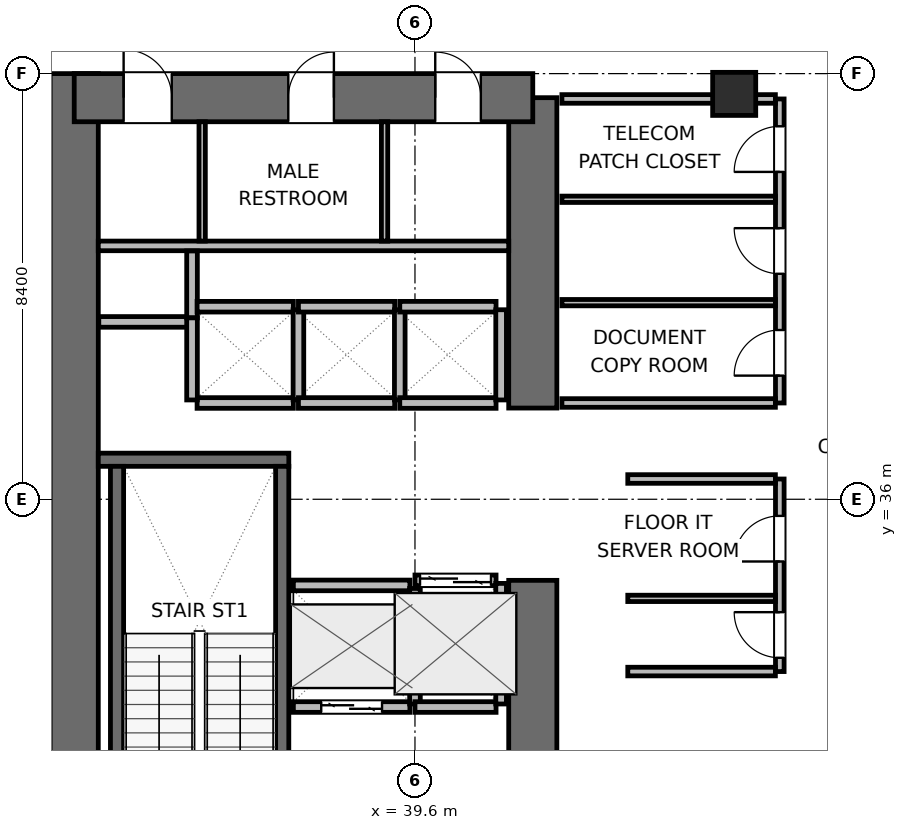
"""IFC4 building model, lengths in metres.
Left out: names, types, materials, properties, quantities, classifications, styles, units other than length and angle.
Written with IfcOpenShell. Run it as: python <this file> out.ifc"""

import sys

from ifc_helpers import new_model, si_unit, direction, frame, frame_2d, origin, origin_2d, place, context, subcontext, project, spatial, rectangle, extrude, element, fill, save


model = new_model("IFC4")
c1 = context("Model", 3, precision=1e-05, world=origin(), true_north=direction((0.0, 1.0)))
c2 = subcontext(c1, "Body", "Model", "MODEL_VIEW")
j1 = project(units=[si_unit("LENGTHUNIT", "METRE"), si_unit("PLANEANGLEUNIT", "RADIAN")], contexts=[c1])
p1 = place(None, origin())
s1 = spatial("IfcSite", under=j1, at=p1, CompositionType="ELEMENT")
p2 = place(p1, origin())
s2 = spatial("IfcBuilding", under=s1, at=p2, CompositionType="ELEMENT")
p3 = place(p2, frame((0.0, 0.0, 37.2)))
s3 = spatial("IfcBuildingStorey", under=s2, at=p3, CompositionType="ELEMENT", Elevation=37.2)
p4 = place(p3, frame((32.875, 27.6, 0.0), z_axis=(0.0, 0.0, 1.0), x_axis=(0.0, 1.0, 0.0)))
e1 = element("IfcWall", 1, at=p4, inside=s3, PredefinedType="SHEAR", context=c2, shape_type="SweptSolid", body=[
    extrude(rectangle(XDim=16.8, YDim=0.95, at=frame_2d((8.4, 0.0))), origin(), (0.0, 0.0, 1.0), 3.9),
])
p5 = place(p3, frame((41.925, 28.075, 0.0), z_axis=(0.0, 0.0, 1.0), x_axis=(0.0, 1.0, 0.0)))
e2 = element("IfcWall", 2, at=p5, inside=s3, PredefinedType="SHEAR", context=c2, shape_type="SweptSolid", body=[
    extrude(rectangle(XDim=6.325, YDim=0.95, at=frame_2d((3.163, 0.0))), origin(), (0.0, 0.0, 1.0), 3.9),
])
p6 = place(p3, frame((41.925, 37.8, 0.0), z_axis=(0.0, 0.0, 1.0), x_axis=(0.0, 1.0, 0.0)))
e3 = element("IfcWall", 3, at=p6, inside=s3, PredefinedType="SHEAR", context=c2, shape_type="SweptSolid", body=[
    extrude(rectangle(XDim=6.125, YDim=0.95, at=frame_2d((3.062, 0.0))), origin(), (0.0, 0.0, 1.0), 3.9),
])
p7 = place(p3, frame((32.875, 43.925, 0.0), z_axis=(0.0, 0.0, 1.0), x_axis=(1.0, 0.0, 0.0)))
e4 = element("IfcWall", 4, at=p7, inside=s3, PredefinedType="SHEAR", context=c2, shape_type="SweptSolid", body=[
    extrude(rectangle(XDim=9.05, YDim=0.95, at=frame_2d((4.525, 0.0))), origin(), (0.0, 0.0, 1.0), 3.9),
])
p8 = place(p7, frame((0.975, 0.0, 0.0)))
e5 = element("IfcOpeningElement", 5, at=p8, cuts=e4, PredefinedType="OPENING", context=c2, shape_type="SweptSolid", body=[
    extrude(rectangle(XDim=0.95, YDim=2.04, at=frame_2d((0.475, 1.02))), frame((0.0, 0.485, 0.0), z_axis=(0.0, -1.0, 0.0), x_axis=(1.0, 0.0, 0.0)), (0.0, 0.0, 1.0), 0.97),
])
p9 = place(p7, frame((4.225, 0.0, 0.0)))
e6 = element("IfcOpeningElement", 6, at=p9, cuts=e4, PredefinedType="OPENING", context=c2, shape_type="SweptSolid", body=[
    extrude(rectangle(XDim=0.9, YDim=2.02, at=frame_2d((0.45, 1.01))), frame((0.0, 0.485, 0.0), z_axis=(0.0, -1.0, 0.0), x_axis=(1.0, 0.0, 0.0)), (0.0, 0.0, 1.0), 0.97),
])
p10 = place(p7, frame((7.125, 0.0, 0.0)))
e7 = element("IfcOpeningElement", 7, at=p10, cuts=e4, PredefinedType="OPENING", context=c2, shape_type="SweptSolid", body=[
    extrude(rectangle(XDim=0.9, YDim=2.02, at=frame_2d((0.45, 1.01))), frame((0.0, 0.485, 0.0), z_axis=(0.0, -1.0, 0.0), x_axis=(1.0, 0.0, 0.0)), (0.0, 0.0, 1.0), 0.97),
])
p11 = place(p3, frame((33.35, 36.78, 0.0), z_axis=(0.0, 0.0, 1.0), x_axis=(1.0, 0.0, 0.0)))
e8 = element("IfcWall", 8, at=p11, inside=s3, PredefinedType="SHEAR", context=c2, shape_type="SweptSolid", body=[
    extrude(rectangle(XDim=3.76, YDim=0.26, at=frame_2d((1.88, 0.0))), origin(), (0.0, 0.0, 1.0), 3.9),
])
p12 = place(p3, frame((33.72, 29.05, 0.0), z_axis=(0.0, 0.0, 1.0), x_axis=(0.0, 1.0, 0.0)))
e9 = element("IfcWall", 9, at=p12, inside=s3, PredefinedType="SHEAR", context=c2, shape_type="SweptSolid", body=[
    extrude(rectangle(XDim=7.6, YDim=0.26, at=frame_2d((3.8, 0.0))), origin(), (0.0, 0.0, 1.0), 3.9),
])
p13 = place(p3, frame((36.98, 29.05, 0.0), z_axis=(0.0, 0.0, 1.0), x_axis=(0.0, 1.0, 0.0)))
e10 = element("IfcWall", 10, at=p13, inside=s3, PredefinedType="SHEAR", context=c2, shape_type="SweptSolid", body=[
    extrude(rectangle(XDim=7.6, YDim=0.26, at=frame_2d((3.8, 0.0))), origin(), (0.0, 0.0, 1.0), 3.9),
])
p14 = place(p13, frame((0.3, 0.0, 0.0)))
e11 = element("IfcOpeningElement", 11, at=p14, cuts=e10, PredefinedType="OPENING", context=c2, shape_type="SweptSolid", body=[
    extrude(rectangle(XDim=1.0, YDim=2.04, at=frame_2d((0.5, 1.02))), frame((0.0, 0.14, 0.0), z_axis=(0.0, -1.0, 0.0), x_axis=(1.0, 0.0, 0.0)), (0.0, 0.0, 1.0), 0.28),
])
p15 = place(p3, frame((45.9, 44.0, 0.0), z_axis=(0.0, 0.0, 1.0), x_axis=(1.0, 0.0, 0.0)))
e12 = element("IfcColumn", 12, at=p15, inside=s3, PredefinedType="COLUMN", context=c2, shape_type="SweptSolid", body=[
    extrude(rectangle(XDim=0.85, YDim=0.85, at=origin_2d()), origin(), (0.0, 0.0, 1.0), 3.9),
])
p16 = place(p3, frame((33.35, 41.0, 0.0), z_axis=(0.0, 0.0, 1.0), x_axis=(1.0, 0.0, 0.0)))
e13 = element("IfcWall", 13, at=p16, inside=s3, PredefinedType="PLUMBINGWALL", context=c2, shape_type="SweptSolid", body=[
    extrude(rectangle(XDim=8.1, YDim=0.19, at=frame_2d((4.05, 0.0))), origin(), (0.0, 0.0, 1.0), 3.64),
])
for number, where, z_axis, x_axis in (
    (14, (35.4, 41.095, 0.0), (0.0, 0.0, 1.0), (0.0, 1.0, 0.0)),
    (15, (39.0, 41.095, 0.0), (0.0, 0.0, 1.0), (0.0, 1.0, 0.0)),
):
    element("IfcWall", number, at=place(p3, frame(where, z_axis=z_axis, x_axis=x_axis)), inside=s3, PredefinedType="PARTITIONING", context=c2, shape_type="SweptSolid", body=[
        extrude(rectangle(XDim=2.355, YDim=0.125, at=frame_2d((1.177, 0.0))), origin(), (0.0, 0.0, 1.0), 3.64),
    ])
p17 = place(p3, frame((33.36, 39.5, 0.0), z_axis=(0.0, 0.0, 1.0), x_axis=(1.0, 0.0, 0.0)))
e16 = element("IfcWall", 16, at=p17, inside=s3, PredefinedType="PARTITIONING", context=c2, shape_type="SweptSolid", body=[
    extrude(rectangle(XDim=1.86, YDim=0.21, at=frame_2d((0.93, 0.0))), origin(), (0.0, 0.0, 1.0), 3.64),
])
p18 = place(p3, frame((35.2, 39.58, 0.0), z_axis=(0.0, 0.0, 1.0), x_axis=(0.0, 1.0, 0.0)))
e17 = element("IfcWall", 17, at=p18, inside=s3, PredefinedType="PARTITIONING", context=c2, shape_type="SweptSolid", body=[
    extrude(rectangle(XDim=1.32, YDim=0.21, at=frame_2d((0.66, 0.0))), origin(), (0.0, 0.0, 1.0), 3.64),
])
p19 = place(p3, frame((37.2, 31.9, 0.0), z_axis=(0.0, 0.0, 1.0), x_axis=(1.0, 0.0, 0.0)))
e18 = element("IfcWall", 18, at=p19, inside=s3, PredefinedType="PARTITIONING", context=c2, shape_type="SweptSolid", body=[
    extrude(rectangle(XDim=2.3, YDim=0.21, at=frame_2d((1.15, 0.0))), origin(), (0.0, 0.0, 1.0), 3.64),
])
p20 = place(p19, frame((0.55, 0.0, 0.0)))
e19 = element("IfcOpeningElement", 19, at=p20, cuts=e18, PredefinedType="OPENING", context=c2, shape_type="SweptSolid", body=[
    extrude(rectangle(XDim=1.2, YDim=2.04, at=frame_2d((0.6, 1.02))), frame((0.0, 0.115, 0.0), z_axis=(0.0, -1.0, 0.0), x_axis=(1.0, 0.0, 0.0)), (0.0, 0.0, 1.0), 0.23),
])
p21 = place(p3, frame((37.2, 34.3, 0.0), z_axis=(0.0, 0.0, 1.0), x_axis=(1.0, 0.0, 0.0)))
e20 = element("IfcWall", 20, at=p21, inside=s3, PredefinedType="PARTITIONING", context=c2, shape_type="SweptSolid", body=[
    extrude(rectangle(XDim=2.3, YDim=0.21, at=frame_2d((1.15, 0.0))), origin(), (0.0, 0.0, 1.0), 3.64),
])
p22 = place(p3, frame((39.6, 31.96, 0.0), z_axis=(0.0, 0.0, 1.0), x_axis=(0.0, 1.0, 0.0)))
e21 = element("IfcWall", 21, at=p22, inside=s3, PredefinedType="PARTITIONING", context=c2, shape_type="SweptSolid", body=[
    extrude(rectangle(XDim=2.28, YDim=0.21, at=frame_2d((1.14, 0.0))), origin(), (0.0, 0.0, 1.0), 3.64),
])
p23 = place(p3, frame((39.6, 34.4, 0.0), z_axis=(0.0, 0.0, 1.0), x_axis=(1.0, 0.0, 0.0)))
e22 = element("IfcWall", 22, at=p23, inside=s3, PredefinedType="PARTITIONING", context=c2, shape_type="SweptSolid", body=[
    extrude(rectangle(XDim=1.6, YDim=0.21, at=frame_2d((0.8, 0.0))), origin(), (0.0, 0.0, 1.0), 3.64),
])
p24 = place(p23, frame((0.1, 0.0, 0.0)))
e23 = element("IfcOpeningElement", 23, at=p24, cuts=e22, PredefinedType="OPENING", context=c2, shape_type="SweptSolid", body=[
    extrude(rectangle(XDim=1.4, YDim=2.06, at=frame_2d((0.7, 1.03))), frame((0.0, 0.115, 0.0), z_axis=(0.0, -1.0, 0.0), x_axis=(1.0, 0.0, 0.0)), (0.0, 0.0, 1.0), 0.23),
])
p25 = place(p3, frame((39.6, 31.9, 0.0), z_axis=(0.0, 0.0, 1.0), x_axis=(1.0, 0.0, 0.0)))
e24 = element("IfcWall", 24, at=p25, inside=s3, PredefinedType="PARTITIONING", context=c2, shape_type="SweptSolid", body=[
    extrude(rectangle(XDim=1.6, YDim=0.21, at=frame_2d((0.8, 0.0))), origin(), (0.0, 0.0, 1.0), 3.64),
])
p26 = place(p3, frame((41.3, 31.96, 0.0), z_axis=(0.0, 0.0, 1.0), x_axis=(0.0, 1.0, 0.0)))
e25 = element("IfcWall", 25, at=p26, inside=s3, PredefinedType="PARTITIONING", context=c2, shape_type="SweptSolid", body=[
    extrude(rectangle(XDim=2.38, YDim=0.21, at=frame_2d((1.19, 0.0))), origin(), (0.0, 0.0, 1.0), 3.64),
])
for number, where, z_axis, x_axis in (
    (26, (35.3, 37.9, 0.0), (0.0, 0.0, 1.0), (1.0, 0.0, 0.0)),
    (27, (35.3, 39.8, 0.0), (0.0, 0.0, 1.0), (1.0, 0.0, 0.0)),
):
    element("IfcWall", number, at=place(p3, frame(where, z_axis=z_axis, x_axis=x_axis)), inside=s3, PredefinedType="PARTITIONING", context=c2, shape_type="SweptSolid", body=[
        extrude(rectangle(XDim=1.9, YDim=0.21, at=frame_2d((0.95, 0.0))), origin(), (0.0, 0.0, 1.0), 3.64),
    ])
p27 = place(p3, frame((35.2, 37.96, 0.0), z_axis=(0.0, 0.0, 1.0), x_axis=(0.0, 1.0, 0.0)))
e28 = element("IfcWall", 28, at=p27, inside=s3, PredefinedType="PARTITIONING", context=c2, shape_type="SweptSolid", body=[
    extrude(rectangle(XDim=1.62, YDim=0.21, at=frame_2d((0.81, 0.0))), origin(), (0.0, 0.0, 1.0), 3.64),
])
p28 = place(p3, frame((37.3, 37.96, 0.0), z_axis=(0.0, 0.0, 1.0), x_axis=(0.0, 1.0, 0.0)))
e29 = element("IfcWall", 29, at=p28, inside=s3, PredefinedType="PARTITIONING", context=c2, shape_type="SweptSolid", body=[
    extrude(rectangle(XDim=1.78, YDim=0.21, at=frame_2d((0.89, 0.0))), origin(), (0.0, 0.0, 1.0), 3.64),
])
for number, where, z_axis, x_axis in (
    (30, (37.3, 37.9, 0.0), (0.0, 0.0, 1.0), (1.0, 0.0, 0.0)),
    (31, (37.3, 39.8, 0.0), (0.0, 0.0, 1.0), (1.0, 0.0, 0.0)),
):
    element("IfcWall", number, at=place(p3, frame(where, z_axis=z_axis, x_axis=x_axis)), inside=s3, PredefinedType="PARTITIONING", context=c2, shape_type="SweptSolid", body=[
        extrude(rectangle(XDim=1.9, YDim=0.21, at=frame_2d((0.95, 0.0))), origin(), (0.0, 0.0, 1.0), 3.64),
    ])
p29 = place(p3, frame((39.3, 37.96, 0.0), z_axis=(0.0, 0.0, 1.0), x_axis=(0.0, 1.0, 0.0)))
e32 = element("IfcWall", 32, at=p29, inside=s3, PredefinedType="PARTITIONING", context=c2, shape_type="SweptSolid", body=[
    extrude(rectangle(XDim=1.78, YDim=0.21, at=frame_2d((0.89, 0.0))), origin(), (0.0, 0.0, 1.0), 3.64),
])
for number, where, z_axis, x_axis in (
    (33, (39.3, 37.9, 0.0), (0.0, 0.0, 1.0), (1.0, 0.0, 0.0)),
    (34, (39.3, 39.8, 0.0), (0.0, 0.0, 1.0), (1.0, 0.0, 0.0)),
):
    element("IfcWall", number, at=place(p3, frame(where, z_axis=z_axis, x_axis=x_axis)), inside=s3, PredefinedType="PARTITIONING", context=c2, shape_type="SweptSolid", body=[
        extrude(rectangle(XDim=1.9, YDim=0.21, at=frame_2d((0.95, 0.0))), origin(), (0.0, 0.0, 1.0), 3.64),
    ])
p30 = place(p3, frame((41.3, 37.96, 0.0), z_axis=(0.0, 0.0, 1.0), x_axis=(0.0, 1.0, 0.0)))
e35 = element("IfcWall", 35, at=p30, inside=s3, PredefinedType="PARTITIONING", context=c2, shape_type="SweptSolid", body=[
    extrude(rectangle(XDim=1.78, YDim=0.21, at=frame_2d((0.89, 0.0))), origin(), (0.0, 0.0, 1.0), 3.64),
])
p31 = place(p3, frame((46.8, 32.6, 0.0), z_axis=(0.0, 0.0, 1.0), x_axis=(0.0, 1.0, 0.0)))
e36 = element("IfcWall", 36, at=p31, inside=s3, PredefinedType="PARTITIONING", context=c2, shape_type="SweptSolid", body=[
    extrude(rectangle(XDim=3.8, YDim=0.17, at=frame_2d((1.9, 0.0))), origin(), (0.0, 0.0, 1.0), 3.64),
])
p32 = place(p31, frame((0.272, 0.0, 0.0)))
e37 = element("IfcOpeningElement", 37, at=p32, cuts=e36, PredefinedType="OPENING", context=c2, shape_type="SweptSolid", body=[
    extrude(rectangle(XDim=0.9, YDim=2.02, at=frame_2d((0.45, 1.01))), frame((0.0, 0.095, 0.0), z_axis=(0.0, -1.0, 0.0), x_axis=(1.0, 0.0, 0.0)), (0.0, 0.0, 1.0), 0.19),
])
p33 = place(p31, frame((2.172, 0.0, 0.0)))
e38 = element("IfcOpeningElement", 38, at=p33, cuts=e36, PredefinedType="OPENING", context=c2, shape_type="SweptSolid", body=[
    extrude(rectangle(XDim=0.9, YDim=2.02, at=frame_2d((0.45, 1.01))), frame((0.0, 0.095, 0.0), z_axis=(0.0, -1.0, 0.0), x_axis=(1.0, 0.0, 0.0)), (0.0, 0.0, 1.0), 0.19),
])
for number, where, z_axis, x_axis in (
    (39, (43.8, 32.6, 0.0), (0.0, 0.0, 1.0), (1.0, 0.0, 0.0)),
    (40, (43.8, 36.4, 0.0), (0.0, 0.0, 1.0), (1.0, 0.0, 0.0)),
):
    element("IfcWall", number, at=place(p3, frame(where, z_axis=z_axis, x_axis=x_axis)), inside=s3, PredefinedType="PARTITIONING", context=c2, shape_type="SweptSolid", body=[
        extrude(rectangle(XDim=2.913, YDim=0.17, at=frame_2d((1.457, 0.0))), origin(), (0.0, 0.0, 1.0), 3.64),
    ])
p34 = place(p3, frame((43.8, 34.044, 0.0), z_axis=(0.0, 0.0, 1.0), x_axis=(1.0, 0.0, 0.0)))
e41 = element("IfcWall", 41, at=p34, inside=s3, PredefinedType="PARTITIONING", context=c2, shape_type="SweptSolid", body=[
    extrude(rectangle(XDim=2.913, YDim=0.125, at=frame_2d((1.457, 0.0))), origin(), (0.0, 0.0, 1.0), 3.64),
])
p35 = place(p3, frame((46.8, 37.9, 0.0), z_axis=(0.0, 0.0, 1.0), x_axis=(0.0, 1.0, 0.0)))
e42 = element("IfcWall", 42, at=p35, inside=s3, PredefinedType="PARTITIONING", context=c2, shape_type="SweptSolid", body=[
    extrude(rectangle(XDim=6.0, YDim=0.17, at=frame_2d((3.0, 0.0))), origin(), (0.0, 0.0, 1.0), 3.64),
])
p36 = place(p35, frame((0.54, 0.0, 0.0)))
e43 = element("IfcOpeningElement", 43, at=p36, cuts=e42, PredefinedType="OPENING", context=c2, shape_type="SweptSolid", body=[
    extrude(rectangle(XDim=0.9, YDim=2.02, at=frame_2d((0.45, 1.01))), frame((0.0, 0.095, 0.0), z_axis=(0.0, -1.0, 0.0), x_axis=(1.0, 0.0, 0.0)), (0.0, 0.0, 1.0), 0.19),
])
p37 = place(p35, frame((2.55, 0.0, 0.0)))
e44 = element("IfcOpeningElement", 44, at=p37, cuts=e42, PredefinedType="OPENING", context=c2, shape_type="SweptSolid", body=[
    extrude(rectangle(XDim=0.9, YDim=2.02, at=frame_2d((0.45, 1.01))), frame((0.0, 0.095, 0.0), z_axis=(0.0, -1.0, 0.0), x_axis=(1.0, 0.0, 0.0)), (0.0, 0.0, 1.0), 0.19),
])
p38 = place(p35, frame((4.56, 0.0, 0.0)))
e45 = element("IfcOpeningElement", 45, at=p38, cuts=e42, PredefinedType="OPENING", context=c2, shape_type="SweptSolid", body=[
    extrude(rectangle(XDim=0.9, YDim=2.02, at=frame_2d((0.45, 1.01))), frame((0.0, 0.095, 0.0), z_axis=(0.0, -1.0, 0.0), x_axis=(1.0, 0.0, 0.0)), (0.0, 0.0, 1.0), 0.19),
])
p39 = place(p3, frame((42.5, 37.9, 0.0), z_axis=(0.0, 0.0, 1.0), x_axis=(1.0, 0.0, 0.0)))
e46 = element("IfcWall", 46, at=p39, inside=s3, PredefinedType="PARTITIONING", context=c2, shape_type="SweptSolid", body=[
    extrude(rectangle(XDim=4.213, YDim=0.17, at=frame_2d((2.106, 0.0))), origin(), (0.0, 0.0, 1.0), 3.64),
])
p40 = place(p3, frame((42.5, 43.9, 0.0), z_axis=(0.0, 0.0, 1.0), x_axis=(1.0, 0.0, 0.0)))
e47 = element("IfcWall", 47, at=p40, inside=s3, PredefinedType="PARTITIONING", context=c2, shape_type="SweptSolid", body=[
    extrude(rectangle(XDim=4.213, YDim=0.17, at=frame_2d((2.106, 0.0))), origin(), (0.0, 0.0, 1.0), 2.525),
])
for number, where, z_axis, x_axis in (
    (48, (42.5, 39.88, 0.0), (0.0, 0.0, 1.0), (1.0, 0.0, 0.0)),
    (49, (42.5, 41.92, 0.0), (0.0, 0.0, 1.0), (1.0, 0.0, 0.0)),
):
    element("IfcWall", number, at=place(p3, frame(where, z_axis=z_axis, x_axis=x_axis)), inside=s3, PredefinedType="PARTITIONING", context=c2, shape_type="SweptSolid", body=[
        extrude(rectangle(XDim=4.213, YDim=0.125, at=frame_2d((2.106, 0.0))), origin(), (0.0, 0.0, 1.0), 3.64),
    ])
p41 = place(p20, origin())
e50 = element("IfcDoor", 50, at=p41, inside=s3, OperationType="DOUBLE_DOOR_SLIDING", PredefinedType="DOOR", context=c2, shape_type="SweptSolid", body=[
    extrude(rectangle(XDim=1.2, YDim=2.04, at=frame_2d((0.6, 1.02))), frame((0.0, 0.025, 0.0), z_axis=(0.0, -1.0, 0.0), x_axis=(1.0, 0.0, 0.0)), (0.0, 0.0, 1.0), 0.05),
])
fill(e19, e50)
p42 = place(p24, origin())
e51 = element("IfcDoor", 51, at=p42, inside=s3, OperationType="DOUBLE_DOOR_SLIDING", PredefinedType="DOOR", context=c2, shape_type="SweptSolid", body=[
    extrude(rectangle(XDim=1.4, YDim=2.06, at=frame_2d((0.7, 1.03))), frame((0.0, 0.025, 0.0), z_axis=(0.0, -1.0, 0.0), x_axis=(1.0, 0.0, 0.0)), (0.0, 0.0, 1.0), 0.05),
])
fill(e23, e51)
p43 = place(p8, origin())
e52 = element("IfcDoor", 52, at=p43, inside=s3, OperationType="SINGLE_SWING_LEFT", PredefinedType="DOOR", context=c2, shape_type="SweptSolid", body=[
    extrude(rectangle(XDim=0.95, YDim=2.04, at=frame_2d((0.475, 1.02))), frame((0.0, 0.025, 0.0), z_axis=(0.0, -1.0, 0.0), x_axis=(1.0, 0.0, 0.0)), (0.0, 0.0, 1.0), 0.05),
])
fill(e5, e52)
p44 = place(p9, origin())
e53 = element("IfcDoor", 53, at=p44, inside=s3, OperationType="SINGLE_SWING_RIGHT", PredefinedType="DOOR", context=c2, shape_type="SweptSolid", body=[
    extrude(rectangle(XDim=0.9, YDim=2.02, at=frame_2d((0.45, 1.01))), frame((0.0, 0.025, 0.0), z_axis=(0.0, -1.0, 0.0), x_axis=(1.0, 0.0, 0.0)), (0.0, 0.0, 1.0), 0.05),
])
fill(e6, e53)
p45 = place(p10, origin())
e54 = element("IfcDoor", 54, at=p45, inside=s3, OperationType="SINGLE_SWING_LEFT", PredefinedType="DOOR", context=c2, shape_type="SweptSolid", body=[
    extrude(rectangle(XDim=0.9, YDim=2.02, at=frame_2d((0.45, 1.01))), frame((0.0, 0.025, 0.0), z_axis=(0.0, -1.0, 0.0), x_axis=(1.0, 0.0, 0.0)), (0.0, 0.0, 1.0), 0.05),
])
fill(e7, e54)
p46 = place(p32, origin())
e55 = element("IfcDoor", 55, at=p46, inside=s3, OperationType="SINGLE_SWING_RIGHT", PredefinedType="DOOR", context=c2, shape_type="SweptSolid", body=[
    extrude(rectangle(XDim=0.9, YDim=2.02, at=frame_2d((0.45, 1.01))), frame((0.0, 0.025, 0.0), z_axis=(0.0, -1.0, 0.0), x_axis=(1.0, 0.0, 0.0)), (0.0, 0.0, 1.0), 0.05),
])
fill(e37, e55)
p47 = place(p33, origin())
e56 = element("IfcDoor", 56, at=p47, inside=s3, OperationType="SINGLE_SWING_LEFT", PredefinedType="DOOR", context=c2, shape_type="SweptSolid", body=[
    extrude(rectangle(XDim=0.9, YDim=2.02, at=frame_2d((0.45, 1.01))), frame((0.0, 0.025, 0.0), z_axis=(0.0, -1.0, 0.0), x_axis=(1.0, 0.0, 0.0)), (0.0, 0.0, 1.0), 0.05),
])
fill(e38, e56)
p48 = place(p36, origin())
e57 = element("IfcDoor", 57, at=p48, inside=s3, OperationType="SINGLE_SWING_LEFT", PredefinedType="DOOR", context=c2, shape_type="SweptSolid", body=[
    extrude(rectangle(XDim=0.9, YDim=2.02, at=frame_2d((0.45, 1.01))), frame((0.0, 0.025, 0.0), z_axis=(0.0, -1.0, 0.0), x_axis=(1.0, 0.0, 0.0)), (0.0, 0.0, 1.0), 0.05),
])
fill(e43, e57)
p49 = place(p37, origin())
e58 = element("IfcDoor", 58, at=p49, inside=s3, OperationType="SINGLE_SWING_RIGHT", PredefinedType="DOOR", context=c2, shape_type="SweptSolid", body=[
    extrude(rectangle(XDim=0.9, YDim=2.02, at=frame_2d((0.45, 1.01))), frame((0.0, 0.025, 0.0), z_axis=(0.0, -1.0, 0.0), x_axis=(1.0, 0.0, 0.0)), (0.0, 0.0, 1.0), 0.05),
])
fill(e44, e58)
p50 = place(p38, origin())
e59 = element("IfcDoor", 59, at=p50, inside=s3, OperationType="SINGLE_SWING_LEFT", PredefinedType="DOOR", context=c2, shape_type="SweptSolid", body=[
    extrude(rectangle(XDim=0.9, YDim=2.02, at=frame_2d((0.45, 1.01))), frame((0.0, 0.025, 0.0), z_axis=(0.0, -1.0, 0.0), x_axis=(1.0, 0.0, 0.0)), (0.0, 0.0, 1.0), 0.05),
])
fill(e45, e59)
save(model, sys.argv[1])
